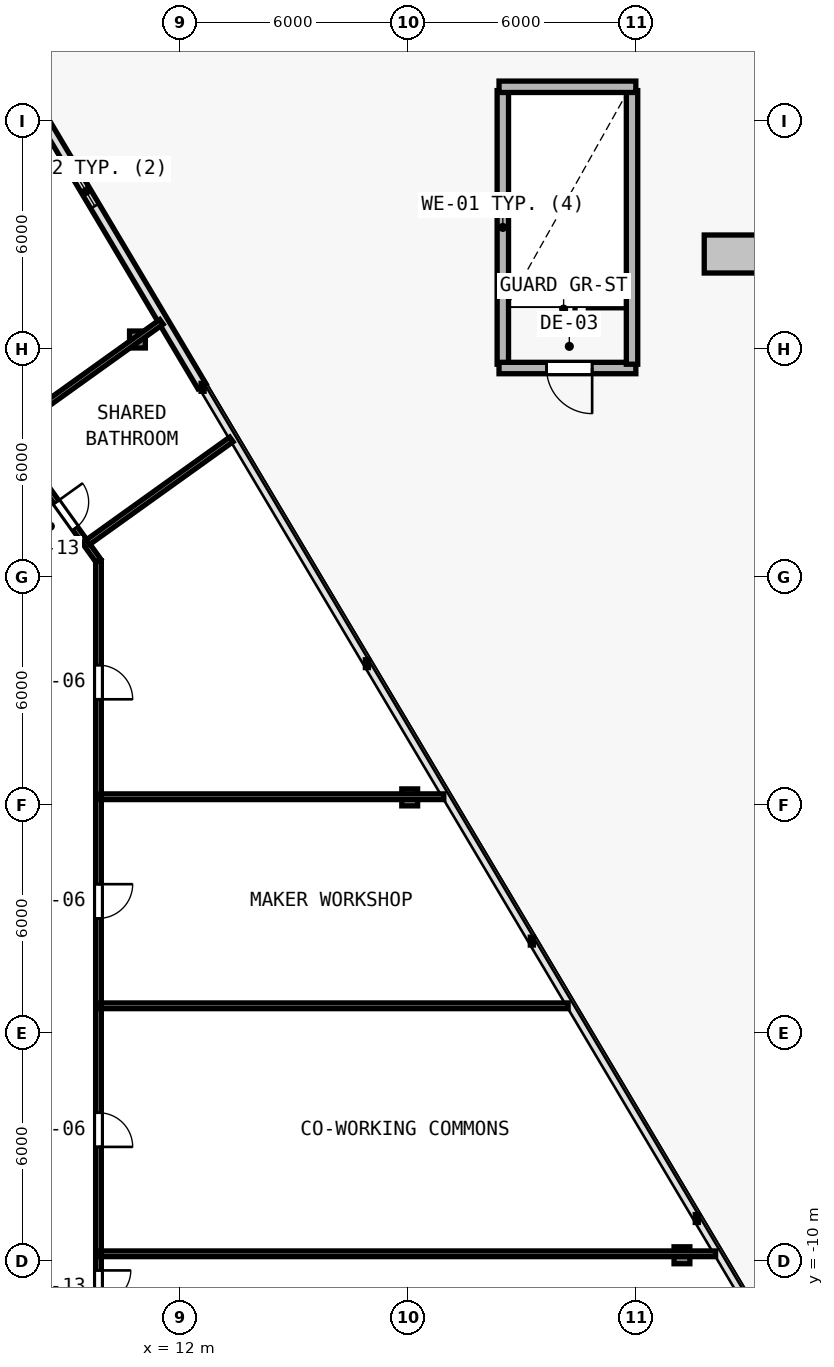
"""IFC4 building model, lengths in metres.
Left out: names, types, materials, properties, quantities, classifications, styles, units other than length and angle.
Written with IfcOpenShell. Run it as: python <this file> out.ifc"""

import sys

from ifc_helpers import new_model, si_unit, direction, frame, frame_2d, origin, origin_2d, place, context, subcontext, project, spatial, rectangle, i_section, extrude, element, fill, save


model = new_model("IFC4")
c1 = context("Model", 3, precision=1e-05, world=origin(), true_north=direction((0.0, 1.0)))
c2 = subcontext(c1, "Body", "Model", "MODEL_VIEW")
j1 = project(units=[si_unit("LENGTHUNIT", "METRE"), si_unit("PLANEANGLEUNIT", "RADIAN")], contexts=[c1])
p1 = place(None, origin())
s1 = spatial("IfcSite", under=j1, at=p1, CompositionType="ELEMENT")
p2 = place(p1, origin())
s2 = spatial("IfcBuilding", under=s1, at=p2, CompositionType="ELEMENT")
p3 = place(p2, frame((0.0, 0.0, 26.4)))
s3 = spatial("IfcBuildingStorey", under=s2, at=p3, CompositionType="ELEMENT", Elevation=26.4)
p4 = place(p3, frame((25.213, -9.845, 0.015), z_axis=(-0.026108683426, 0.021677705821, 0.999424040996), x_axis=(-0.638800249892, -0.769372628015, 0.0)))
e1 = element("IfcColumn", 1, at=p4, inside=s3, PredefinedType="COLUMN", context=c2, shape_type="SweptSolid", body=[
    extrude(i_section(OverallWidth=0.416, OverallDepth=0.446, WebThickness=0.025, FlangeThickness=0.04, FilletRadius=0.015, at=origin_2d()), origin(), (0.0, 0.0, 1.0), 3.581),
])
p5 = place(p3, frame((18.05, 2.202, 0.015), z_axis=(-0.018957587265, 0.009615179153, 0.999774053582), x_axis=(-0.452339157861, -0.891845999187, 0.0)))
e2 = element("IfcColumn", 2, at=p5, inside=s3, PredefinedType="COLUMN", context=c2, shape_type="SweptSolid", body=[
    extrude(i_section(OverallWidth=0.416, OverallDepth=0.446, WebThickness=0.025, FlangeThickness=0.04, FilletRadius=0.015, at=origin_2d()), origin(), (0.0, 0.0, 1.0), 3.58),
])
p6 = place(p3, frame((10.885, 14.25, 0.015), z_axis=(-0.0117309588, -0.002591723456, 0.999927831183), x_axis=(0.215728093413, -0.976453475447, 0.0)))
e3 = element("IfcColumn", 3, at=p6, inside=s3, PredefinedType="COLUMN", context=c2, shape_type="SweptSolid", body=[
    extrude(i_section(OverallWidth=0.416, OverallDepth=0.446, WebThickness=0.025, FlangeThickness=0.04, FilletRadius=0.015, at=origin_2d()), origin(), (0.0, 0.0, 1.0), 3.58),
])
p7 = place(p3, frame((20.5, 13.6, 0.0), z_axis=(0.0, 0.0, 1.0), x_axis=(0.0, 1.0, 0.0)))
e4 = element("IfcWall", 4, at=p7, inside=s3, PredefinedType="SOLIDWALL", context=c2, shape_type="SweptSolid", body=[
    extrude(rectangle(XDim=7.2, YDim=0.3, at=frame_2d((3.6, 0.0))), origin(), (0.0, 0.0, 1.0), 3.35),
])
p8 = place(p3, frame((24.0, 13.5, 0.0), z_axis=(0.0, 0.0, 1.0), x_axis=(-1.0, 0.0, 0.0)))
e5 = element("IfcWall", 5, at=p8, inside=s3, PredefinedType="SOLIDWALL", context=c2, shape_type="SweptSolid", body=[
    extrude(rectangle(XDim=3.6, YDim=0.3, at=frame_2d((1.8, 0.0))), origin(), (0.0, 0.0, 1.0), 3.35),
])
p9 = place(p8, frame((1.15, 0.0, 0.0)))
e6 = element("IfcOpeningElement", 6, at=p9, cuts=e5, PredefinedType="OPENING", context=c2, shape_type="SweptSolid", body=[
    extrude(rectangle(XDim=1.2, YDim=2.2, at=frame_2d((0.6, 1.1))), frame((0.0, 0.16, 0.0), z_axis=(0.0, -1.0, 0.0), x_axis=(1.0, 0.0, 0.0)), (0.0, 0.0, 1.0), 0.32),
])
p10 = place(p3, frame((23.9, 20.8, 0.0), z_axis=(0.0, 0.0, 1.0), x_axis=(0.0, -1.0, 0.0)))
e7 = element("IfcWall", 7, at=p10, inside=s3, PredefinedType="SOLIDWALL", context=c2, shape_type="SweptSolid", body=[
    extrude(rectangle(XDim=7.2, YDim=0.3, at=frame_2d((3.6, 0.0))), origin(), (0.0, 0.0, 1.0), 3.35),
])
p11 = place(p3, frame((20.4, 20.9, 0.0), z_axis=(0.0, 0.0, 1.0), x_axis=(1.0, 0.0, 0.0)))
e8 = element("IfcWall", 8, at=p11, inside=s3, PredefinedType="SOLIDWALL", context=c2, shape_type="SweptSolid", body=[
    extrude(rectangle(XDim=3.6, YDim=0.3, at=frame_2d((1.8, 0.0))), origin(), (0.0, 0.0, 1.0), 3.35),
])
p12 = place(p3, frame((6.483, 23.278, 0.0), z_axis=(0.0, 0.0, 1.0), x_axis=(0.511086421046, -0.859529330635, 0.0)))
e9 = element("IfcWall", 9, at=p12, inside=s3, PredefinedType="SOLIDWALL", context=c2, shape_type="SweptSolid", body=[
    extrude(rectangle(XDim=11.935, YDim=0.25, at=frame_2d((5.968, 0.0))), origin(), (0.0, 0.0, 1.0), 3.35),
])
p13 = place(p12, frame((5.518, 0.0, 0.62)))
e10 = element("IfcOpeningElement", 10, at=p13, cuts=e9, PredefinedType="OPENING", context=c2, shape_type="SweptSolid", body=[
    extrude(rectangle(XDim=0.9, YDim=1.6, at=frame_2d((0.45, 0.8))), frame((0.0, 0.135, 0.0), z_axis=(0.0, -1.0, 0.0), x_axis=(1.0, 0.0, 0.0)), (0.0, 0.0, 1.0), 0.27),
])
p14 = place(p3, frame((7.041, 12.36, 0.0), z_axis=(0.0, 0.0, 1.0), x_axis=(0.582449511476, -0.812866881218, 0.0)))
e11 = element("IfcWall", 11, at=p14, inside=s3, PredefinedType="PARTITIONING", context=c2, shape_type="SweptSolid", body=[
    extrude(rectangle(XDim=4.84, YDim=0.15, at=frame_2d((2.42, 0.0))), origin(), (0.0, 0.0, 1.0), 2.725),
])
p15 = place(p14, frame((2.937, 0.0, 0.0)))
e12 = element("IfcOpeningElement", 12, at=p15, cuts=e11, PredefinedType="OPENING", context=c2, shape_type="SweptSolid", body=[
    extrude(rectangle(XDim=0.85, YDim=2.1, at=frame_2d((0.425, 1.05))), frame((0.0, 0.085, 0.0), z_axis=(0.0, -1.0, 0.0), x_axis=(1.0, 0.0, 0.0)), (0.0, 0.0, 1.0), 0.17),
])
p16 = place(p3, frame((9.86, 8.426, 0.0), z_axis=(0.0, 0.0, 1.0), x_axis=(0.0, -1.0, 0.0)))
e13 = element("IfcWall", 13, at=p16, inside=s3, PredefinedType="PARTITIONING", context=c2, shape_type="SweptSolid", body=[
    extrude(rectangle(XDim=19.986, YDim=0.15, at=frame_2d((9.993, 0.0))), origin(), (0.0, 0.0, 1.0), 2.609),
])
p17 = place(p16, frame((18.67, 0.0, 0.0)))
e14 = element("IfcOpeningElement", 14, at=p17, cuts=e13, PredefinedType="OPENING", context=c2, shape_type="SweptSolid", body=[
    extrude(rectangle(XDim=0.85, YDim=2.1, at=frame_2d((0.425, 1.05))), frame((0.0, 0.085, 0.0), z_axis=(0.0, -1.0, 0.0), x_axis=(1.0, 0.0, 0.0)), (0.0, 0.0, 1.0), 0.17),
])
p18 = place(p16, frame((14.52, 0.0, 0.0)))
e15 = element("IfcOpeningElement", 15, at=p18, cuts=e13, PredefinedType="OPENING", context=c2, shape_type="SweptSolid", body=[
    extrude(rectangle(XDim=0.9, YDim=2.1, at=frame_2d((0.45, 1.05))), frame((0.0, 0.085, 0.0), z_axis=(0.0, -1.0, 0.0), x_axis=(1.0, 0.0, 0.0)), (0.0, 0.0, 1.0), 0.17),
])
p19 = place(p16, frame((8.507, 0.0, 0.0)))
e16 = element("IfcOpeningElement", 16, at=p19, cuts=e13, PredefinedType="OPENING", context=c2, shape_type="SweptSolid", body=[
    extrude(rectangle(XDim=0.9, YDim=2.1, at=frame_2d((0.45, 1.05))), frame((0.0, 0.085, 0.0), z_axis=(0.0, -1.0, 0.0), x_axis=(1.0, 0.0, 0.0)), (0.0, 0.0, 1.0), 0.17),
])
p20 = place(p16, frame((2.742, 0.0, 0.0)))
e17 = element("IfcOpeningElement", 17, at=p20, cuts=e13, PredefinedType="OPENING", context=c2, shape_type="SweptSolid", body=[
    extrude(rectangle(XDim=0.9, YDim=2.1, at=frame_2d((0.45, 1.05))), frame((0.0, 0.085, 0.0), z_axis=(0.0, -1.0, 0.0), x_axis=(1.0, 0.0, 0.0)), (0.0, 0.0, 1.0), 0.17),
])
p21 = place(p3, frame((9.92, -9.807, 0.0), z_axis=(0.0, 0.0, 1.0), x_axis=(1.0, 0.0, 0.0)))
e18 = element("IfcWall", 18, at=p21, inside=s3, PredefinedType="PARTITIONING", context=c2, shape_type="SweptSolid", body=[
    extrude(rectangle(XDim=16.178, YDim=0.15, at=frame_2d((8.089, 0.0))), origin(), (0.0, 0.0, 1.0), 2.609),
])
p22 = place(p3, frame((9.92, 2.219, 0.0), z_axis=(0.0, 0.0, 1.0), x_axis=(1.0, 0.0, 0.0)))
e19 = element("IfcWall", 19, at=p22, inside=s3, PredefinedType="PARTITIONING", context=c2, shape_type="SweptSolid", body=[
    extrude(rectangle(XDim=9.027, YDim=0.15, at=frame_2d((4.513, 0.0))), origin(), (0.0, 0.0, 1.0), 2.735),
])
p23 = place(p3, frame((7.494, 11.831, 0.0), z_axis=(0.0, 0.0, 1.0), x_axis=(0.812879401772, 0.582432037386, 0.0)))
e20 = element("IfcWall", 20, at=p23, inside=s3, PredefinedType="PARTITIONING", context=c2, shape_type="SweptSolid", body=[
    extrude(rectangle(XDim=4.95, YDim=0.15, at=frame_2d((2.475, 0.0))), origin(), (0.0, 0.0, 1.0), 2.725),
])
p24 = place(p3, frame((9.92, -3.282, 0.0), z_axis=(0.0, 0.0, 1.0), x_axis=(1.0, 0.0, 0.0)))
e21 = element("IfcWall", 21, at=p24, inside=s3, PredefinedType="PARTITIONING", context=c2, shape_type="SweptSolid", body=[
    extrude(rectangle(XDim=12.298, YDim=0.15, at=frame_2d((6.149, 0.0))), origin(), (0.0, 0.0, 1.0), 2.735),
])
p25 = place(p3, frame((9.582, 8.917, 0.0), z_axis=(0.0, 0.0, 1.0), x_axis=(0.812883510428, 0.582426303041, 0.0)))
e22 = element("IfcWall", 22, at=p25, inside=s3, PredefinedType="PARTITIONING", context=c2, shape_type="SweptSolid", body=[
    extrude(rectangle(XDim=4.643, YDim=0.15, at=frame_2d((2.322, 0.0))), origin(), (0.0, 0.0, 1.0), 2.735),
])
p26 = place(p9, origin())
e23 = element("IfcDoor", 23, at=p26, inside=s3, OperationType="SINGLE_SWING_LEFT", PredefinedType="DOOR", context=c2, shape_type="SweptSolid", body=[
    extrude(rectangle(XDim=1.2, YDim=2.2, at=frame_2d((0.6, 1.1))), frame((0.0, 0.025, 0.0), z_axis=(0.0, -1.0, 0.0), x_axis=(1.0, 0.0, 0.0)), (0.0, 0.0, 1.0), 0.05),
])
fill(e6, e23)
p27 = place(p13, origin())
e24 = element("IfcWindow", 24, at=p27, inside=s3, PartitioningType="SINGLE_PANEL", PredefinedType="WINDOW", context=c2, shape_type="SweptSolid", body=[
    extrude(rectangle(XDim=0.9, YDim=1.6, at=frame_2d((0.45, 0.8))), frame((0.0, 0.03, 0.0), z_axis=(0.0, -1.0, 0.0), x_axis=(1.0, 0.0, 0.0)), (0.0, 0.0, 1.0), 0.06),
])
fill(e10, e24)
p28 = place(p17, origin())
e25 = element("IfcDoor", 25, at=p28, inside=s3, OperationType="SINGLE_SWING_LEFT", PredefinedType="DOOR", context=c2, shape_type="SweptSolid", body=[
    extrude(rectangle(XDim=0.85, YDim=2.1, at=frame_2d((0.425, 1.05))), frame((0.0, 0.025, 0.0), z_axis=(0.0, -1.0, 0.0), x_axis=(1.0, 0.0, 0.0)), (0.0, 0.0, 1.0), 0.05),
])
fill(e14, e25)
p29 = place(p18, origin())
e26 = element("IfcDoor", 26, at=p29, inside=s3, OperationType="SINGLE_SWING_RIGHT", PredefinedType="DOOR", context=c2, shape_type="SweptSolid", body=[
    extrude(rectangle(XDim=0.9, YDim=2.1, at=frame_2d((0.45, 1.05))), frame((0.0, 0.025, 0.0), z_axis=(0.0, -1.0, 0.0), x_axis=(1.0, 0.0, 0.0)), (0.0, 0.0, 1.0), 0.05),
])
fill(e15, e26)
p30 = place(p19, origin())
e27 = element("IfcDoor", 27, at=p30, inside=s3, OperationType="SINGLE_SWING_LEFT", PredefinedType="DOOR", context=c2, shape_type="SweptSolid", body=[
    extrude(rectangle(XDim=0.9, YDim=2.1, at=frame_2d((0.45, 1.05))), frame((0.0, 0.025, 0.0), z_axis=(0.0, -1.0, 0.0), x_axis=(1.0, 0.0, 0.0)), (0.0, 0.0, 1.0), 0.05),
])
fill(e16, e27)
p31 = place(p20, origin())
e28 = element("IfcDoor", 28, at=p31, inside=s3, OperationType="SINGLE_SWING_RIGHT", PredefinedType="DOOR", context=c2, shape_type="SweptSolid", body=[
    extrude(rectangle(XDim=0.9, YDim=2.1, at=frame_2d((0.45, 1.05))), frame((0.0, 0.025, 0.0), z_axis=(0.0, -1.0, 0.0), x_axis=(1.0, 0.0, 0.0)), (0.0, 0.0, 1.0), 0.05),
])
fill(e17, e28)
p32 = place(p15, origin())
e29 = element("IfcDoor", 29, at=p32, inside=s3, OperationType="SINGLE_SWING_LEFT", PredefinedType="DOOR", context=c2, shape_type="SweptSolid", body=[
    extrude(rectangle(XDim=0.85, YDim=2.1, at=frame_2d((0.425, 1.05))), frame((0.0, 0.025, 0.0), z_axis=(0.0, -1.0, 0.0), x_axis=(1.0, 0.0, 0.0)), (0.0, 0.0, 1.0), 0.05),
])
fill(e12, e29)
save(model, sys.argv[1])
